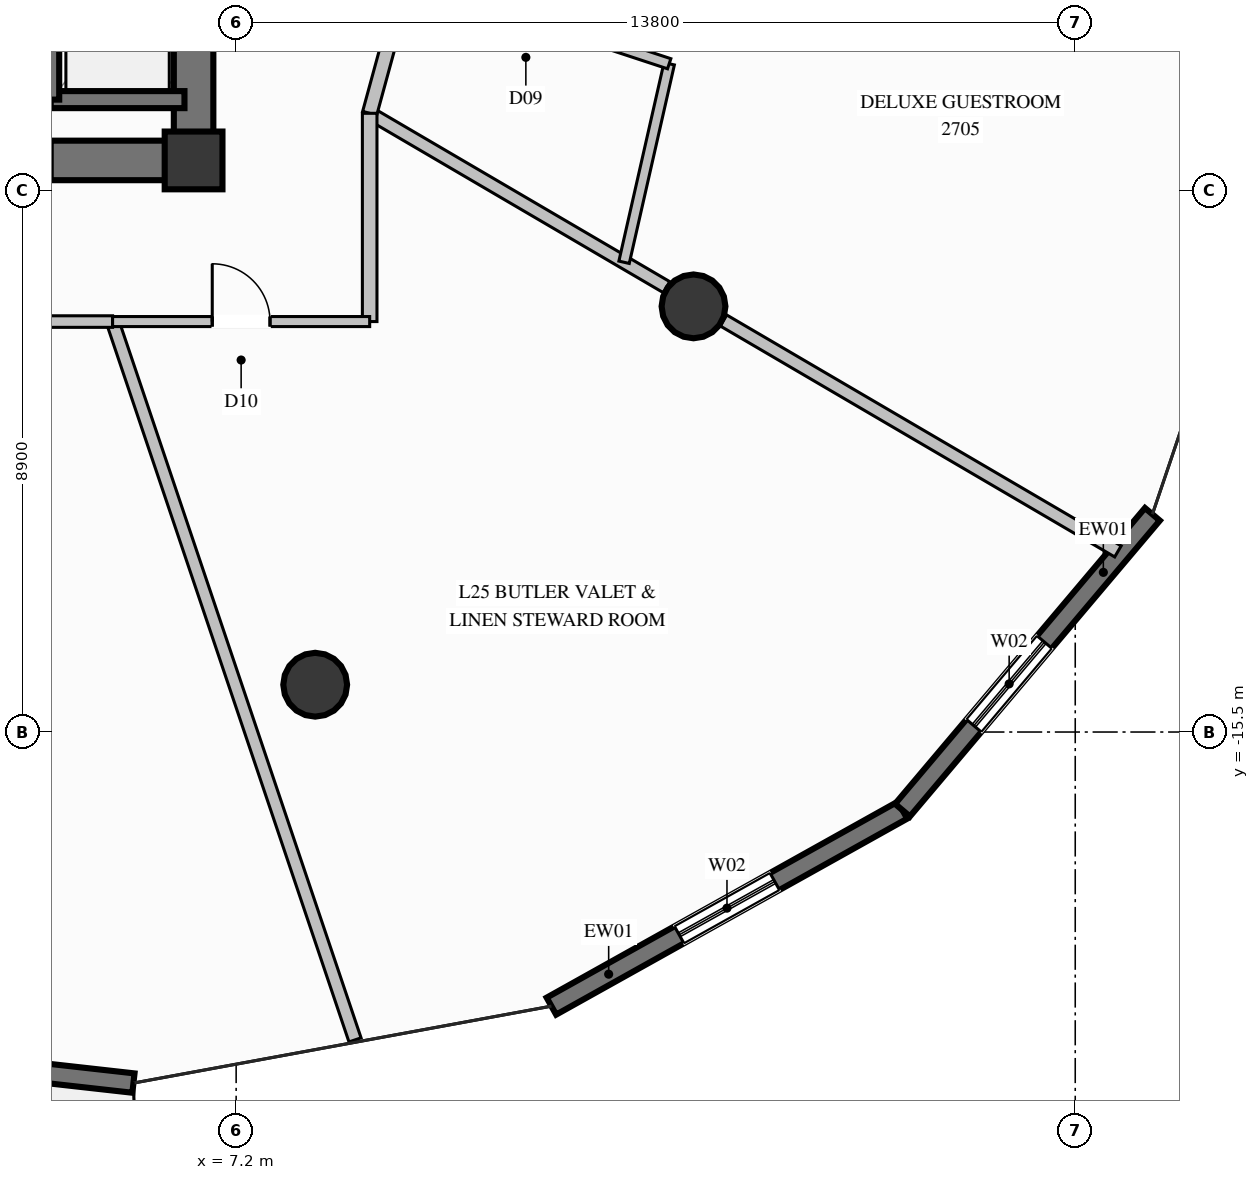
"""IFC4 building model, lengths in metres.
Left out: names, types, materials, properties, quantities, classifications, styles, units other than length and angle.
Written with IfcOpenShell. Run it as: python <this file> out.ifc"""

import sys

from ifc_helpers import new_model, si_unit, direction, frame, frame_2d, origin, origin_2d, place, context, subcontext, project, spatial, rectangle, circle, extrude, element, fill, save


model = new_model("IFC4")
c1 = context("Model", 3, precision=1e-05, world=origin(), true_north=direction((0.0, 1.0)))
c2 = subcontext(c1, "Body", "Model", "MODEL_VIEW")
j1 = project(units=[si_unit("LENGTHUNIT", "METRE"), si_unit("PLANEANGLEUNIT", "RADIAN")], contexts=[c1])
p1 = place(None, origin())
s1 = spatial("IfcSite", under=j1, at=p1, CompositionType="ELEMENT")
p2 = place(p1, origin())
s2 = spatial("IfcBuilding", under=s1, at=p2, CompositionType="ELEMENT")
p3 = place(p2, frame((0.0, 0.0, 102.6)))
s3 = spatial("IfcBuildingStorey", under=s2, at=p3, CompositionType="ELEMENT", Elevation=102.6)
p4 = place(p3, frame((6.5, -6.1, 0.0), z_axis=(0.0, 0.0, 1.0), x_axis=(1.0, 0.0, 0.0)))
e1 = element("IfcColumn", 1, at=p4, inside=s3, PredefinedType="COLUMN", context=c2, shape_type="SweptSolid", body=[
    extrude(rectangle(XDim=0.95, YDim=0.95, at=origin_2d()), origin(), (0.0, 0.0, 1.0), 3.6),
])
p5 = place(p3, frame((4.15, -6.1, 0.0), z_axis=(0.0, 0.0, 1.0), x_axis=(1.0, 0.0, 0.0)))
e2 = element("IfcWall", 2, at=p5, inside=s3, PredefinedType="SHEAR", context=c2, shape_type="SweptSolid", body=[
    extrude(rectangle(XDim=2.025, YDim=0.65, at=frame_2d((1.013, 0.0))), origin(), (0.0, 0.0, 1.0), 3.6),
])
p6 = place(p3, frame((6.5, -6.425, 0.0), z_axis=(0.0, 0.0, 1.0), x_axis=(0.0, 1.0, 0.0)))
e3 = element("IfcWall", 3, at=p6, inside=s3, PredefinedType="SHEAR", context=c2, shape_type="SweptSolid", body=[
    extrude(rectangle(XDim=4.075, YDim=0.65, at=frame_2d((2.038, 0.0))), origin(), (0.0, 0.0, 1.0), 3.6),
])
for number, where, z_axis, x_axis in (
    (4, (8.5, -14.722, 0.0), (0.0, 0.0, 1.0), (1.0, 0.0, 0.0)),
    (5, (14.722, -8.5, 0.0), (0.0, 0.0, 1.0), (1.0, 0.0, 0.0)),
):
    element("IfcColumn", number, at=place(p3, frame(where, z_axis=z_axis, x_axis=x_axis)), inside=s3, PredefinedType="COLUMN", context=c2, shape_type="SweptSolid", body=[
        extrude(circle(Radius=0.525, at=origin_2d()), origin(), (0.0, 0.0, 1.0), 3.6),
    ])
p7 = place(p3, frame((5.511, -21.273, 0.0), z_axis=(0.0, 0.0, 1.0), x_axis=(-0.993784044115, 0.111325081016, 0.0)))
e6 = element("IfcWall", 6, at=p7, inside=s3, PredefinedType="SOLIDWALL", context=c2, shape_type="SweptSolid", body=[
    extrude(rectangle(XDim=7.347, YDim=0.32, at=frame_2d((3.673, 0.0))), origin(), (0.0, 0.0, 1.0), 3.35),
])
p8 = place(p7, frame((2.773, 0.0, 0.35)))
e7 = element("IfcOpeningElement", 7, at=p8, cuts=e6, PredefinedType="OPENING", context=c2, shape_type="SweptSolid", body=[
    extrude(rectangle(XDim=1.8, YDim=2.6, at=frame_2d((0.9, 1.3))), frame((0.0, 0.17, 0.0), z_axis=(0.0, -1.0, 0.0), x_axis=(1.0, 0.0, 0.0)), (0.0, 0.0, 1.0), 0.34),
])
p9 = place(p3, frame((18.159, -16.785, 0.0), z_axis=(0.0, 0.0, 1.0), x_axis=(-0.873166276034, -0.487422459882, 0.0)))
e8 = element("IfcWall", 8, at=p9, inside=s3, PredefinedType="SOLIDWALL", context=c2, shape_type="SweptSolid", body=[
    extrude(rectangle(XDim=6.613, YDim=0.32, at=frame_2d((3.306, 0.0))), origin(), (0.0, 0.0, 1.0), 3.35),
])
p10 = place(p9, frame((2.406, 0.0, 0.35)))
e9 = element("IfcOpeningElement", 9, at=p10, cuts=e8, PredefinedType="OPENING", context=c2, shape_type="SweptSolid", body=[
    extrude(rectangle(XDim=1.8, YDim=2.6, at=frame_2d((0.9, 1.3))), frame((0.0, 0.17, 0.0), z_axis=(0.0, -1.0, 0.0), x_axis=(1.0, 0.0, 0.0)), (0.0, 0.0, 1.0), 0.34),
])
p11 = place(p3, frame((22.269, -11.919, 0.0), z_axis=(0.0, 0.0, 1.0), x_axis=(-0.645278763483, -0.763947195425, 0.0)))
e10 = element("IfcWall", 10, at=p11, inside=s3, PredefinedType="SOLIDWALL", context=c2, shape_type="SweptSolid", body=[
    extrude(rectangle(XDim=6.369, YDim=0.32, at=frame_2d((3.185, 0.0))), origin(), (0.0, 0.0, 1.0), 3.35),
])
p12 = place(p11, frame((2.751, 0.0, 0.35)))
e11 = element("IfcOpeningElement", 11, at=p12, cuts=e10, PredefinedType="OPENING", context=c2, shape_type="SweptSolid", body=[
    extrude(rectangle(XDim=1.8, YDim=2.6, at=frame_2d((0.9, 1.3))), frame((0.0, 0.17, 0.0), z_axis=(0.0, -1.0, 0.0), x_axis=(1.0, 0.0, 0.0)), (0.0, 0.0, 1.0), 0.34),
])
p13 = place(p3, frame((4.15, -5.1, 0.0), z_axis=(0.0, 0.0, 1.0), x_axis=(1.0, 0.0, 0.0)))
e12 = element("IfcWall", 12, at=p13, inside=s3, PredefinedType="SOLIDWALL", context=c2, shape_type="SweptSolid", body=[
    extrude(rectangle(XDim=2.2, YDim=0.28, at=frame_2d((1.1, 0.0))), origin(), (0.0, 0.0, 1.0), 3.35),
])
p14 = place(p3, frame((4.15, -2.4, 0.0), z_axis=(0.0, 0.0, 1.0), x_axis=(0.0, -1.0, 0.0)))
e13 = element("IfcWall", 13, at=p14, inside=s3, PredefinedType="SOLIDWALL", context=c2, shape_type="SweptSolid", body=[
    extrude(rectangle(XDim=2.7, YDim=0.28, at=frame_2d((1.35, 0.0))), origin(), (0.0, 0.0, 1.0), 3.35),
])
p15 = place(p3, frame((9.396, -5.325, 0.0), z_axis=(0.0, 0.0, 1.0), x_axis=(0.862912125579, -0.505353998232, 0.0)))
e14 = element("IfcWall", 14, at=p15, inside=s3, PredefinedType="PARTITIONING", context=c2, shape_type="SweptSolid", body=[
    extrude(rectangle(XDim=5.658, YDim=0.21, at=frame_2d((2.829, 0.0))), origin(), (0.0, 0.0, 1.0), 2.791),
])
p16 = place(p3, frame((15.215, -8.732, 0.0), z_axis=(0.0, 0.0, 1.0), x_axis=(0.862960241997, -0.505271828556, 0.0)))
e15 = element("IfcWall", 15, at=p16, inside=s3, PredefinedType="PARTITIONING", context=c2, shape_type="SweptSolid", body=[
    extrude(rectangle(XDim=7.517, YDim=0.21, at=frame_2d((3.758, 0.0))), origin(), (0.0, 0.0, 1.0), 3.35),
])
p17 = place(p3, frame((9.396, -5.325, 0.0), z_axis=(0.0, 0.0, 1.0), x_axis=(0.263643210908, 0.964620265878, 0.0)))
e16 = element("IfcWall", 16, at=p17, inside=s3, PredefinedType="PARTITIONING", context=c2, shape_type="SweptSolid", body=[
    extrude(rectangle(XDim=2.318, YDim=0.24, at=frame_2d((1.159, 0.0))), origin(), (0.0, 0.0, 1.0), 3.35),
])
p18 = place(p3, frame((13.58, -7.775, 0.0), z_axis=(0.0, 0.0, 1.0), x_axis=(0.221599041774, 0.975137869578, 0.0)))
e17 = element("IfcWall", 17, at=p18, inside=s3, PredefinedType="PLUMBINGWALL", context=c2, shape_type="SweptSolid", body=[
    extrude(rectangle(XDim=3.348, YDim=0.175, at=frame_2d((1.674, 0.0))), origin(), (0.0, 0.0, 1.0), 3.35),
])
p19 = place(p3, frame((10.007, -3.089, 0.0), z_axis=(0.0, 0.0, 1.0), x_axis=(0.949827092004, -0.312775471057, 0.0)))
e18 = element("IfcWall", 18, at=p19, inside=s3, PredefinedType="PLUMBINGWALL", context=c2, shape_type="SweptSolid", body=[
    extrude(rectangle(XDim=4.543, YDim=0.175, at=frame_2d((2.271, 0.0))), origin(), (0.0, 0.0, 1.0), 3.35),
])
p20 = place(p19, frame((1.821, 0.0, 0.0)))
e19 = element("IfcOpeningElement", 19, at=p20, cuts=e18, PredefinedType="OPENING", context=c2, shape_type="SweptSolid", body=[
    extrude(rectangle(XDim=0.9, YDim=2.1, at=frame_2d((0.45, 1.05))), frame((0.0, 0.098, 0.0), z_axis=(0.0, -1.0, 0.0), x_axis=(1.0, 0.0, 0.0)), (0.0, 0.0, 1.0), 0.195),
])
p21 = place(p3, frame((5.168, -8.75, 0.0), z_axis=(0.0, 0.0, 1.0), x_axis=(0.319791389232, -0.947487977429, 0.0)))
e20 = element("IfcWall", 20, at=p21, inside=s3, PredefinedType="PARTITIONING", context=c2, shape_type="SweptSolid", body=[
    extrude(rectangle(XDim=12.468, YDim=0.21, at=frame_2d((6.234, 0.0))), origin(), (0.0, 0.0, 1.0), 3.35),
])
p22 = place(p3, frame((0.0, -8.75, 0.0), z_axis=(0.0, 0.0, 1.0), x_axis=(1.0, 0.0, 0.0)))
e21 = element("IfcWall", 21, at=p22, inside=s3, PredefinedType="PARTITIONING", context=c2, shape_type="SweptSolid", body=[
    extrude(rectangle(XDim=5.168, YDim=0.19, at=frame_2d((2.584, 0.0))), origin(), (0.0, 0.0, 1.0), 3.35),
])
p23 = place(p22, frame((2.109, 0.0, 0.0)))
e22 = element("IfcOpeningElement", 22, at=p23, cuts=e21, PredefinedType="OPENING", context=c2, shape_type="SweptSolid", body=[
    extrude(rectangle(XDim=0.95, YDim=2.1, at=frame_2d((0.475, 1.05))), frame((0.0, 0.105, 0.0), z_axis=(0.0, -1.0, 0.0), x_axis=(1.0, 0.0, 0.0)), (0.0, 0.0, 1.0), 0.21),
])
p24 = place(p3, frame((9.396, -8.75, 0.0), z_axis=(0.0, 0.0, 1.0), x_axis=(0.0, 1.0, 0.0)))
e23 = element("IfcWall", 23, at=p24, inside=s3, PredefinedType="PARTITIONING", context=c2, shape_type="SweptSolid", body=[
    extrude(rectangle(XDim=3.425, YDim=0.24, at=frame_2d((1.712, 0.0))), origin(), (0.0, 0.0, 1.0), 3.35),
])
p25 = place(p3, frame((5.168, -8.75, 0.0), z_axis=(0.0, 0.0, 1.0), x_axis=(1.0, 0.0, 0.0)))
e24 = element("IfcWall", 24, at=p25, inside=s3, PredefinedType="PARTITIONING", context=c2, shape_type="SweptSolid", body=[
    extrude(rectangle(XDim=4.228, YDim=0.165, at=frame_2d((2.114, 0.0))), origin(), (0.0, 0.0, 1.0), 3.35),
])
p26 = place(p25, frame((1.639, 0.0, 0.0)))
e25 = element("IfcOpeningElement", 25, at=p26, cuts=e24, PredefinedType="OPENING", context=c2, shape_type="SweptSolid", body=[
    extrude(rectangle(XDim=0.95, YDim=2.1, at=frame_2d((0.475, 1.05))), frame((0.0, 0.093, 0.0), z_axis=(0.0, -1.0, 0.0), x_axis=(1.0, 0.0, 0.0)), (0.0, 0.0, 1.0), 0.185),
])
p27 = place(p10, origin())
e26 = element("IfcWindow", 26, at=p27, inside=s3, PartitioningType="SINGLE_PANEL", PredefinedType="WINDOW", context=c2, shape_type="SweptSolid", body=[
    extrude(rectangle(XDim=1.8, YDim=2.6, at=frame_2d((0.9, 1.3))), frame((0.0, 0.03, 0.0), z_axis=(0.0, -1.0, 0.0), x_axis=(1.0, 0.0, 0.0)), (0.0, 0.0, 1.0), 0.06),
])
fill(e9, e26)
p28 = place(p12, origin())
e27 = element("IfcWindow", 27, at=p28, inside=s3, PartitioningType="SINGLE_PANEL", PredefinedType="WINDOW", context=c2, shape_type="SweptSolid", body=[
    extrude(rectangle(XDim=1.8, YDim=2.6, at=frame_2d((0.9, 1.3))), frame((0.0, 0.03, 0.0), z_axis=(0.0, -1.0, 0.0), x_axis=(1.0, 0.0, 0.0)), (0.0, 0.0, 1.0), 0.06),
])
fill(e11, e27)
p29 = place(p26, origin())
e28 = element("IfcDoor", 28, at=p29, inside=s3, OperationType="SINGLE_SWING_LEFT", PredefinedType="DOOR", context=c2, shape_type="SweptSolid", body=[
    extrude(rectangle(XDim=0.95, YDim=2.1, at=frame_2d((0.475, 1.05))), frame((0.0, 0.025, 0.0), z_axis=(0.0, -1.0, 0.0), x_axis=(1.0, 0.0, 0.0)), (0.0, 0.0, 1.0), 0.05),
])
fill(e25, e28)
save(model, sys.argv[1])
